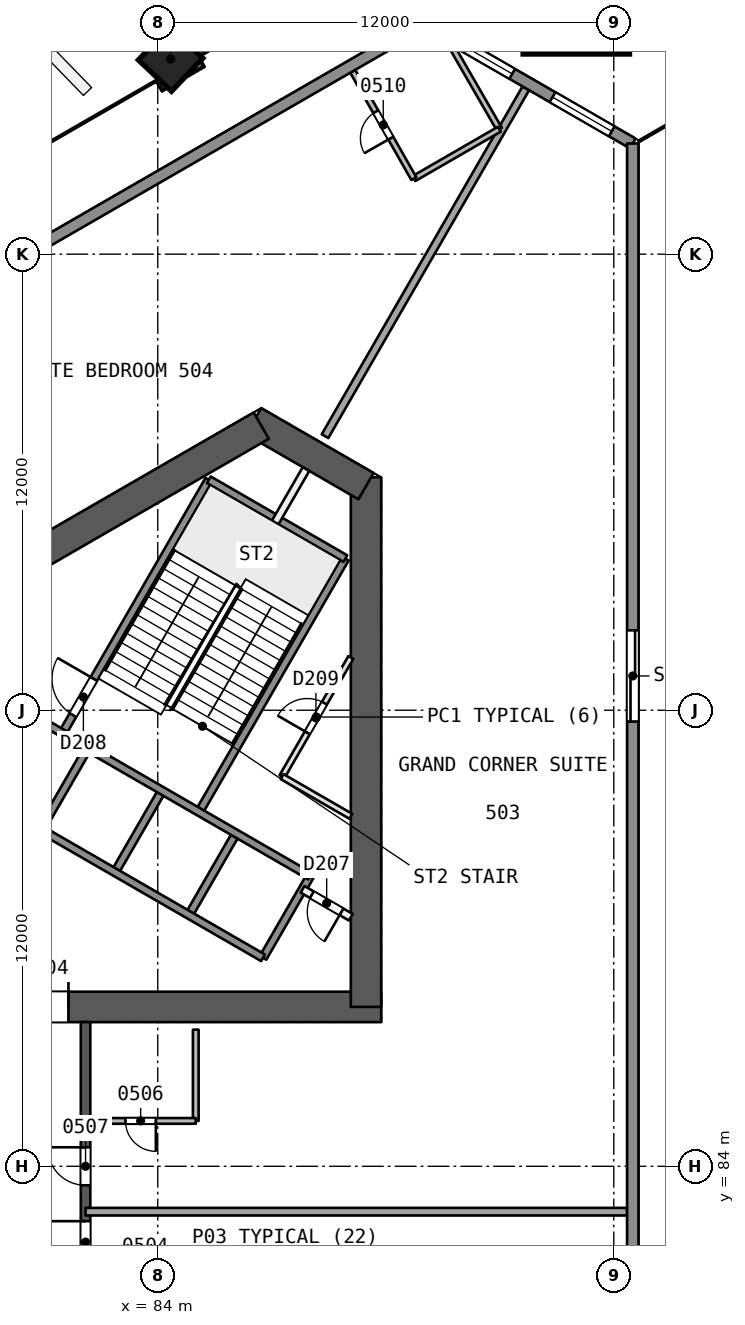
"""IFC4 building model, lengths in metres.
Left out: names, types, materials, properties, quantities, classifications, styles, units other than length and angle.
Written with IfcOpenShell. Run it as: python <this file> out.ifc"""

import sys

from ifc_helpers import new_model, si_unit, direction, frame, frame_2d, origin, origin_2d, place, context, subcontext, project, spatial, rectangle, extrude, element, fill, save


model = new_model("IFC4")
c1 = context("Model", 3, precision=1e-05, world=origin(), true_north=direction((0.0, 1.0)))
c2 = subcontext(c1, "Body", "Model", "MODEL_VIEW")
j1 = project(units=[si_unit("LENGTHUNIT", "METRE"), si_unit("PLANEANGLEUNIT", "RADIAN")], contexts=[c1])
p1 = place(None, origin())
s1 = spatial("IfcSite", under=j1, at=p1, CompositionType="ELEMENT")
p2 = place(p1, origin())
s2 = spatial("IfcBuilding", under=s1, at=p2, CompositionType="ELEMENT")
p3 = place(p2, frame((0.0, 0.0, 30.0)))
s3 = spatial("IfcBuildingStorey", under=s2, at=p3, CompositionType="ELEMENT", Elevation=30.0)
p4 = place(p3, frame((79.731, 88.194, 0.0), z_axis=(0.0, 0.0, 1.0), x_axis=(1.0, 0.0, 0.0)))
e1 = element("IfcWall", 1, at=p4, inside=s3, PredefinedType="SHEAR", context=c2, shape_type="SweptSolid", body=[
    extrude(rectangle(XDim=10.149, YDim=0.8, at=frame_2d((5.074, 0.0))), origin(), (0.0, 0.0, 1.0), 3.7),
])
p5 = place(p4, frame((0.719, 0.0, 0.0)))
e2 = element("IfcOpeningElement", 2, at=p5, cuts=e1, PredefinedType="OPENING", context=c2, shape_type="SweptSolid", body=[
    extrude(rectangle(XDim=1.2, YDim=2.1, at=frame_2d((0.6, 1.05))), frame((0.0, 0.411, 0.0), z_axis=(0.0, -1.0, 0.0), x_axis=(1.0, 0.0, 0.0)), (0.0, 0.0, 1.0), 0.821),
])
p6 = place(p3, frame((89.48, 88.194, 0.0), z_axis=(0.0, 0.0, 1.0), x_axis=(0.0, 1.0, 0.0)))
e3 = element("IfcWall", 3, at=p6, inside=s3, PredefinedType="SHEAR", context=c2, shape_type="SweptSolid", body=[
    extrude(rectangle(XDim=13.933, YDim=0.8, at=frame_2d((6.967, 0.0))), origin(), (0.0, 0.0, 1.0), 3.7),
])
p7 = place(p3, frame((89.48, 101.897, 0.0), z_axis=(0.0, 0.0, 1.0), x_axis=(-0.866034355626, 0.499984494636, 0.0)))
e4 = element("IfcWall", 4, at=p7, inside=s3, PredefinedType="SHEAR", context=c2, shape_type="SweptSolid", body=[
    extrude(rectangle(XDim=3.414, YDim=0.8, at=frame_2d((1.707, 0.0))), origin(), (0.0, 0.0, 1.0), 3.7),
])
p8 = place(p3, frame((86.723, 103.488, 0.0), z_axis=(0.0, 0.0, 1.0), x_axis=(-0.866032504327, -0.499987701298, 0.0)))
e5 = element("IfcWall", 5, at=p8, inside=s3, PredefinedType="SHEAR", context=c2, shape_type="SweptSolid", body=[
    extrude(rectangle(XDim=14.102, YDim=0.8, at=frame_2d((7.051, 0.0))), origin(), (0.0, 0.0, 1.0), 3.7),
])
p9 = place(p3, frame((82.1, 72.206, 0.0), z_axis=(0.0, 0.0, 1.0), x_axis=(0.0, 1.0, 0.0)))
e6 = element("IfcWall", 6, at=p9, inside=s3, PredefinedType="SHEAR", context=c2, shape_type="SweptSolid", body=[
    extrude(rectangle(XDim=15.588, YDim=0.25, at=frame_2d((7.794, 0.0))), origin(), (0.0, 0.0, 1.0), 3.2),
])
p10 = place(p9, frame((2.618, 0.0, 0.0)))
e7 = element("IfcOpeningElement", 7, at=p10, cuts=e6, PredefinedType="OPENING", context=c2, shape_type="SweptSolid", body=[
    extrude(rectangle(XDim=1.0, YDim=2.1, at=frame_2d((0.5, 1.05))), frame((0.0, 0.135, 0.0), z_axis=(0.0, -1.0, 0.0), x_axis=(1.0, 0.0, 0.0)), (0.0, 0.0, 1.0), 0.271),
])
p11 = place(p9, frame((9.25, 0.0, 0.0)))
e8 = element("IfcOpeningElement", 8, at=p11, cuts=e6, PredefinedType="OPENING", context=c2, shape_type="SweptSolid", body=[
    extrude(rectangle(XDim=1.1, YDim=2.1, at=frame_2d((0.55, 1.05))), frame((0.0, 0.135, 0.0), z_axis=(0.0, -1.0, 0.0), x_axis=(1.0, 0.0, 0.0)), (0.0, 0.0, 1.0), 0.271),
])
p12 = place(p9, frame((11.294, 0.0, 0.0)))
e9 = element("IfcOpeningElement", 9, at=p12, cuts=e6, PredefinedType="OPENING", context=c2, shape_type="SweptSolid", body=[
    extrude(rectangle(XDim=1.0, YDim=2.1, at=frame_2d((0.5, 1.05))), frame((0.0, 0.135, 0.0), z_axis=(0.0, -1.0, 0.0), x_axis=(1.0, 0.0, 0.0)), (0.0, 0.0, 1.0), 0.271),
])
p13 = place(p3, frame((95.035, 114.702, 0.0), z_axis=(-0.017607037296, -0.030466109479, 0.999380712447), x_axis=(0.500064653071, 0.865272876704, 0.035187946645)))
e10 = element("IfcColumn", 10, at=p13, inside=s3, PredefinedType="COLUMN", context=c2, shape_type="SweptSolid", body=[
    extrude(rectangle(XDim=2.8, YDim=2.8, at=origin_2d()), origin(), (0.0, 0.0, 1.0), 3.702),
])
p14 = place(p3, frame((84.349, 113.168, 0.0), z_axis=(-0.008376454378, -0.028163354484, 0.999568237028), x_axis=(0.865850871468, 0.499846877556, 0.02133933866)))
e11 = element("IfcColumn", 11, at=p14, inside=s3, PredefinedType="COLUMN", context=c2, shape_type="SweptSolid", body=[
    extrude(rectangle(XDim=1.2, YDim=1.2, at=origin_2d()), origin(), (0.0, 0.0, 1.0), 3.702),
])
p15 = place(p3, frame((96.351, 82.806, 0.0), z_axis=(0.0, 0.0, 1.0), x_axis=(-1.0, 0.0, 0.0)))
e12 = element("IfcWall", 12, at=p15, inside=s3, PredefinedType="PARTITIONING", context=c2, shape_type="SweptSolid", body=[
    extrude(rectangle(XDim=14.251, YDim=0.2, at=frame_2d((7.125, 0.0))), origin(), (0.0, 0.0, 1.0), 3.2),
])
p16 = place(p3, frame((85.0, 87.595, 0.0), z_axis=(0.0, 0.0, 1.0), x_axis=(0.0, -1.0, 0.0)))
e13 = element("IfcWall", 13, at=p16, inside=s3, PredefinedType="PARTITIONING", context=c2, shape_type="SweptSolid", body=[
    extrude(rectangle(XDim=2.401, YDim=0.15, at=frame_2d((1.2, 0.0))), origin(), (0.0, 0.0, 1.0), 3.2),
])
p17 = place(p3, frame((85.0, 85.194, 0.0), z_axis=(0.0, 0.0, 1.0), x_axis=(-1.0, 0.0, 0.0)))
e14 = element("IfcWall", 14, at=p17, inside=s3, PredefinedType="PARTITIONING", context=c2, shape_type="SweptSolid", body=[
    extrude(rectangle(XDim=2.9, YDim=0.15, at=frame_2d((1.45, 0.0))), origin(), (0.0, 0.0, 1.0), 3.2),
])
p18 = place(p17, frame((1.05, 0.0, 0.0)))
e15 = element("IfcOpeningElement", 15, at=p18, cuts=e14, PredefinedType="OPENING", context=c2, shape_type="SweptSolid", body=[
    extrude(rectangle(XDim=0.8, YDim=2.1, at=frame_2d((0.4, 1.05))), frame((0.0, 0.085, 0.0), z_axis=(0.0, -1.0, 0.0), x_axis=(1.0, 0.0, 0.0)), (0.0, 0.0, 1.0), 0.171),
])
p19 = place(p3, frame((93.686, 112.365, 0.0), z_axis=(0.0, 0.0, 1.0), x_axis=(-0.499997037832, -0.866027113986, 0.0)))
e16 = element("IfcWall", 16, at=p19, inside=s3, PredefinedType="PARTITIONING", context=c2, shape_type="SweptSolid", body=[
    extrude(rectangle(XDim=10.57, YDim=0.2, at=frame_2d((5.285, 0.0))), origin(), (0.0, 0.0, 1.0), 3.2),
])
p20 = place(p3, frame((91.709, 113.506, 0.0), z_axis=(0.0, 0.0, 1.0), x_axis=(0.500025035936, -0.866010948798, 0.0)))
e17 = element("IfcWall", 17, at=p20, inside=s3, PredefinedType="PARTITIONING", context=c2, shape_type="SweptSolid", body=[
    extrude(rectangle(XDim=2.561, YDim=0.15, at=frame_2d((1.28, 0.0))), origin(), (0.0, 0.0, 1.0), 3.2),
])
p21 = place(p3, frame((92.99, 111.288, 0.0), z_axis=(0.0, 0.0, 1.0), x_axis=(-0.866021400173, -0.500006934395, 0.0)))
e18 = element("IfcWall", 18, at=p21, inside=s3, PredefinedType="PARTITIONING", context=c2, shape_type="SweptSolid", body=[
    extrude(rectangle(XDim=2.6, YDim=0.15, at=frame_2d((1.3, 0.0))), origin(), (0.0, 0.0, 1.0), 3.2),
])
p22 = place(p3, frame((90.738, 109.988, 0.0), z_axis=(0.0, 0.0, 1.0), x_axis=(-0.494941047154, 0.868926556069, 0.0)))
e19 = element("IfcWall", 19, at=p22, inside=s3, PredefinedType="PARTITIONING", context=c2, shape_type="SweptSolid", body=[
    extrude(rectangle(XDim=3.25, YDim=0.15, at=frame_2d((1.625, 0.0))), origin(), (0.0, 0.0, 1.0), 3.2),
])
p23 = place(p22, frame((1.225, 0.0, 0.0)))
e20 = element("IfcOpeningElement", 20, at=p23, cuts=e19, PredefinedType="OPENING", context=c2, shape_type="SweptSolid", body=[
    extrude(rectangle(XDim=0.8, YDim=2.1, at=frame_2d((0.4, 1.05))), frame((0.0, 0.085, 0.0), z_axis=(0.0, -1.0, 0.0), x_axis=(1.0, 0.0, 0.0)), (0.0, 0.0, 1.0), 0.171),
])
p24 = place(p3, frame((91.021, 114.076, 0.0), z_axis=(0.0, 0.0, 1.0), x_axis=(0.866033291922, -0.499986337096, 0.0)))
e21 = element("IfcWall", 21, at=p24, inside=s3, PredefinedType="SOLIDWALL", context=c2, shape_type="SweptSolid", body=[
    extrude(rectangle(XDim=6.327, YDim=0.3, at=frame_2d((3.164, 0.0))), origin(), (0.0, 0.0, 1.0), 3.2),
])
p25 = place(p24, frame((0.863, 0.0, 0.9)))
e22 = element("IfcOpeningElement", 22, at=p25, cuts=e21, PredefinedType="OPENING", context=c2, shape_type="SweptSolid", body=[
    extrude(rectangle(XDim=1.8, YDim=1.5, at=frame_2d((0.9, 0.75))), frame((0.0, 0.161, 0.0), z_axis=(0.0, -1.0, 0.0), x_axis=(1.0, 0.0, 0.0)), (0.0, 0.0, 1.0), 0.321),
])
p26 = place(p24, frame((3.888, 0.0, 0.9)))
e23 = element("IfcOpeningElement", 23, at=p26, cuts=e21, PredefinedType="OPENING", context=c2, shape_type="SweptSolid", body=[
    extrude(rectangle(XDim=1.8, YDim=1.5, at=frame_2d((0.9, 0.75))), frame((0.0, 0.161, 0.0), z_axis=(0.0, -1.0, 0.0), x_axis=(1.0, 0.0, 0.0)), (0.0, 0.0, 1.0), 0.321),
])
p27 = place(p3, frame((96.5, 110.912, 0.0), z_axis=(0.0, 0.0, 1.0), x_axis=(0.0, -1.0, 0.0)))
e24 = element("IfcWall", 24, at=p27, inside=s3, PredefinedType="SOLIDWALL", context=c2, shape_type="SweptSolid", body=[
    extrude(rectangle(XDim=61.825, YDim=0.3, at=frame_2d((30.912, 0.0))), origin(), (0.0, 0.0, 1.0), 3.2),
])
p28 = place(p27, frame((29.089, 0.0, 0.0)))
e25 = element("IfcOpeningElement", 25, at=p28, cuts=e24, PredefinedType="OPENING", context=c2, shape_type="SweptSolid", body=[
    extrude(rectangle(XDim=2.4, YDim=2.4, at=frame_2d((1.2, 1.2))), frame((0.0, 0.161, 0.0), z_axis=(0.0, -1.0, 0.0), x_axis=(1.0, 0.0, 0.0)), (0.0, 0.0, 1.0), 0.321),
])
p29 = place(p27, frame((34.389, 0.0, 0.0)))
e26 = element("IfcOpeningElement", 26, at=p29, cuts=e24, PredefinedType="OPENING", context=c2, shape_type="SweptSolid", body=[
    extrude(rectangle(XDim=2.4, YDim=2.4, at=frame_2d((1.2, 1.2))), frame((0.0, 0.161, 0.0), z_axis=(0.0, -1.0, 0.0), x_axis=(1.0, 0.0, 0.0)), (0.0, 0.0, 1.0), 0.321),
])
p30 = place(p27, frame((47.93, 0.0, 0.0)))
e27 = element("IfcOpeningElement", 27, at=p30, cuts=e24, PredefinedType="OPENING", context=c2, shape_type="SweptSolid", body=[
    extrude(rectangle(XDim=2.4, YDim=2.4, at=frame_2d((1.2, 1.2))), frame((0.0, 0.161, 0.0), z_axis=(0.0, -1.0, 0.0), x_axis=(1.0, 0.0, 0.0)), (0.0, 0.0, 1.0), 0.321),
])
p31 = place(p27, frame((12.81, 0.0, 0.0)))
e28 = element("IfcOpeningElement", 28, at=p31, cuts=e24, PredefinedType="OPENING", context=c2, shape_type="SweptSolid", body=[
    extrude(rectangle(XDim=2.4, YDim=2.4, at=frame_2d((1.2, 1.2))), frame((0.0, 0.161, 0.0), z_axis=(0.0, -1.0, 0.0), x_axis=(1.0, 0.0, 0.0)), (0.0, 0.0, 1.0), 0.321),
])
p32 = place(p3, frame((37.479, 83.163, 0.0), z_axis=(0.0, 0.0, 1.0), x_axis=(0.866024340432, 0.500001841776, 0.0)))
e29 = element("IfcWall", 29, at=p32, inside=s3, PredefinedType="SOLIDWALL", context=c2, shape_type="SweptSolid", body=[
    extrude(rectangle(XDim=61.824, YDim=0.3, at=frame_2d((30.912, 0.0))), origin(), (0.0, 0.0, 1.0), 3.2),
])
p33 = place(p32, frame((29.556, 0.0, 0.0)))
e30 = element("IfcOpeningElement", 30, at=p33, cuts=e29, PredefinedType="OPENING", context=c2, shape_type="SweptSolid", body=[
    extrude(rectangle(XDim=2.4, YDim=2.4, at=frame_2d((1.2, 1.2))), frame((0.0, 0.161, 0.0), z_axis=(0.0, -1.0, 0.0), x_axis=(1.0, 0.0, 0.0)), (0.0, 0.0, 1.0), 0.321),
])
p34 = place(p32, frame((35.012, 0.0, 0.0)))
e31 = element("IfcOpeningElement", 31, at=p34, cuts=e29, PredefinedType="OPENING", context=c2, shape_type="SweptSolid", body=[
    extrude(rectangle(XDim=2.4, YDim=2.4, at=frame_2d((1.2, 1.2))), frame((0.0, 0.161, 0.0), z_axis=(0.0, -1.0, 0.0), x_axis=(1.0, 0.0, 0.0)), (0.0, 0.0, 1.0), 0.321),
])
p35 = place(p32, frame((47.93, 0.0, 0.0)))
e32 = element("IfcOpeningElement", 32, at=p35, cuts=e29, PredefinedType="OPENING", context=c2, shape_type="SweptSolid", body=[
    extrude(rectangle(XDim=2.4, YDim=2.4, at=frame_2d((1.2, 1.2))), frame((0.0, 0.161, 0.0), z_axis=(0.0, -1.0, 0.0), x_axis=(1.0, 0.0, 0.0)), (0.0, 0.0, 1.0), 0.321),
])
p36 = place(p32, frame((24.256, 0.0, 0.0)))
e33 = element("IfcOpeningElement", 33, at=p36, cuts=e29, PredefinedType="OPENING", context=c2, shape_type="SweptSolid", body=[
    extrude(rectangle(XDim=2.4, YDim=2.4, at=frame_2d((1.2, 1.2))), frame((0.0, 0.161, 0.0), z_axis=(0.0, -1.0, 0.0), x_axis=(1.0, 0.0, 0.0)), (0.0, 0.0, 1.0), 0.321),
])
p37 = place(p32, frame((11.509, 0.0, 0.0)))
e34 = element("IfcOpeningElement", 34, at=p37, cuts=e29, PredefinedType="OPENING", context=c2, shape_type="SweptSolid", body=[
    extrude(rectangle(XDim=2.4, YDim=2.4, at=frame_2d((1.2, 1.2))), frame((0.0, 0.161, 0.0), z_axis=(0.0, -1.0, 0.0), x_axis=(1.0, 0.0, 0.0)), (0.0, 0.0, 1.0), 0.321),
])
p38 = place(p3, frame((86.77, 89.486, 0.0), z_axis=(0.0, 0.0, 1.0), x_axis=(0.499961042966, 0.86604789447, 0.0)))
e35 = element("IfcWall", 35, at=p38, inside=s3, PredefinedType="SOLIDWALL", context=c2, shape_type="SweptSolid", body=[
    extrude(rectangle(XDim=2.48, YDim=0.2, at=frame_2d((1.24, 0.0))), origin(), (0.0, 0.0, 1.0), 3.2),
])
p39 = place(p3, frame((87.271, 94.254, 0.0), z_axis=(0.0, 0.0, 1.0), x_axis=(0.500043727655, 0.866000156139, 0.0)))
e36 = element("IfcWall", 36, at=p39, inside=s3, PredefinedType="PARTITIONING", context=c2, shape_type="SweptSolid", body=[
    extrude(rectangle(XDim=3.618, YDim=0.15, at=frame_2d((1.809, 0.0))), origin(), (0.0, 0.0, 1.0), 3.2),
])
p40 = place(p39, frame((1.332, 0.0, 0.0)))
e37 = element("IfcOpeningElement", 37, at=p40, cuts=e36, PredefinedType="OPENING", context=c2, shape_type="SweptSolid", body=[
    extrude(rectangle(XDim=0.9, YDim=2.1, at=frame_2d((0.45, 1.05))), frame((0.0, 0.085, 0.0), z_axis=(0.0, -1.0, 0.0), x_axis=(1.0, 0.0, 0.0)), (0.0, 0.0, 1.0), 0.171),
])
p41 = place(p3, frame((84.821, 90.611, 0.0), z_axis=(0.0, 0.0, 1.0), x_axis=(0.499961042966, 0.86604789447, 0.0)))
e38 = element("IfcWall", 38, at=p41, inside=s3, PredefinedType="SOLIDWALL", context=c2, shape_type="SweptSolid", body=[
    extrude(rectangle(XDim=2.48, YDim=0.2, at=frame_2d((1.24, 0.0))), origin(), (0.0, 0.0, 1.0), 3.2),
])
p42 = place(p3, frame((85.087, 93.321, 0.0), z_axis=(0.0, 0.0, 1.0), x_axis=(0.500019787375, 0.866013979237, 0.0)))
e39 = element("IfcWall", 39, at=p42, inside=s3, PredefinedType="SOLIDWALL", context=c2, shape_type="SweptSolid", body=[
    extrude(rectangle(XDim=7.7, YDim=0.2, at=frame_2d((3.85, 0.0))), origin(), (0.0, 0.0, 1.0), 3.2),
])
p43 = place(p3, frame((82.873, 91.736, 0.0), z_axis=(0.0, 0.0, 1.0), x_axis=(0.499961042966, 0.86604789447, 0.0)))
e40 = element("IfcWall", 40, at=p43, inside=s3, PredefinedType="SOLIDWALL", context=c2, shape_type="SweptSolid", body=[
    extrude(rectangle(XDim=2.48, YDim=0.2, at=frame_2d((1.24, 0.0))), origin(), (0.0, 0.0, 1.0), 3.2),
])
p44 = place(p3, frame((87.09, 100.94, 0.0), z_axis=(0.0, 0.0, 1.0), x_axis=(0.499956811548, 0.866050337213, 0.0)))
e41 = element("IfcWall", 41, at=p44, inside=s3, PredefinedType="PARTITIONING", context=c2, shape_type="SweptSolid", body=[
    extrude(rectangle(XDim=1.623, YDim=0.2, at=frame_2d((0.812, 0.0))), origin(), (0.0, 0.0, 1.0), 3.2),
])
p45 = place(p3, frame((80.924, 92.861, 0.0), z_axis=(0.0, 0.0, 1.0), x_axis=(0.499961042966, 0.86604789447, 0.0)))
e42 = element("IfcWall", 42, at=p45, inside=s3, PredefinedType="SOLIDWALL", context=c2, shape_type="SweptSolid", body=[
    extrude(rectangle(XDim=2.48, YDim=0.2, at=frame_2d((1.24, 0.0))), origin(), (0.0, 0.0, 1.0), 3.2),
])
p46 = place(p3, frame((81.493, 95.396, 0.0), z_axis=(0.0, 0.0, 1.0), x_axis=(0.500006057782, 0.866021906294, 0.0)))
e43 = element("IfcWall", 43, at=p46, inside=s3, PredefinedType="SOLIDWALL", context=c2, shape_type="SweptSolid", body=[
    extrude(rectangle(XDim=7.7, YDim=0.2, at=frame_2d((3.85, 0.0))), origin(), (0.0, 0.0, 1.0), 3.2),
])
p47 = place(p46, frame((0.55, 0.0, 0.0)))
e44 = element("IfcOpeningElement", 44, at=p47, cuts=e43, PredefinedType="OPENING", context=c2, shape_type="SweptSolid", body=[
    extrude(rectangle(XDim=1.1, YDim=2.1, at=frame_2d((0.55, 1.05))), frame((0.0, 0.11, 0.0), z_axis=(0.0, -1.0, 0.0), x_axis=(1.0, 0.0, 0.0)), (0.0, 0.0, 1.0), 0.221),
])
p48 = place(p3, frame((86.77, 89.486, 0.0), z_axis=(0.0, 0.0, 1.0), x_axis=(-0.86601811187, 0.500012629753, 0.0)))
e45 = element("IfcWall", 45, at=p48, inside=s3, PredefinedType="SOLIDWALL", context=c2, shape_type="SweptSolid", body=[
    extrude(rectangle(XDim=10.9, YDim=0.2, at=frame_2d((5.45, 0.0))), origin(), (0.0, 0.0, 1.0), 3.2),
])
p49 = place(p3, frame((89.08, 90.554, 0.0), z_axis=(0.0, 0.0, 1.0), x_axis=(-0.866022048785, 0.500005810984, 0.0)))
e46 = element("IfcWall", 46, at=p49, inside=s3, PredefinedType="PARTITIONING", context=c2, shape_type="SweptSolid", body=[
    extrude(rectangle(XDim=1.467, YDim=0.2, at=frame_2d((0.733, 0.0))), origin(), (0.0, 0.0, 1.0), 3.2),
])
p50 = place(p49, frame((0.283, 0.0, 0.0)))
e47 = element("IfcOpeningElement", 47, at=p50, cuts=e46, PredefinedType="OPENING", context=c2, shape_type="SweptSolid", body=[
    extrude(rectangle(XDim=0.9, YDim=2.1, at=frame_2d((0.45, 1.05))), frame((0.0, 0.11, 0.0), z_axis=(0.0, -1.0, 0.0), x_axis=(1.0, 0.0, 0.0)), (0.0, 0.0, 1.0), 0.221),
])
p51 = place(p3, frame((88.01, 91.634, 0.0), z_axis=(0.0, 0.0, 1.0), x_axis=(-0.866024315419, 0.5000018851, 0.0)))
e48 = element("IfcWall", 48, at=p51, inside=s3, PredefinedType="SOLIDWALL", context=c2, shape_type="SweptSolid", body=[
    extrude(rectangle(XDim=9.0, YDim=0.2, at=frame_2d((4.5, 0.0))), origin(), (0.0, 0.0, 1.0), 3.2),
])
p52 = place(p3, frame((89.08, 93.21, 0.0), z_axis=(0.0, 0.0, 1.0), x_axis=(-0.866033778982, 0.499985493453, 0.0)))
e49 = element("IfcWall", 49, at=p52, inside=s3, PredefinedType="PARTITIONING", context=c2, shape_type="SweptSolid", body=[
    extrude(rectangle(XDim=2.089, YDim=0.15, at=frame_2d((1.044, 0.0))), origin(), (0.0, 0.0, 1.0), 3.2),
])
p53 = place(p3, frame((88.937, 99.99, 0.0), z_axis=(0.0, 0.0, 1.0), x_axis=(-0.866004344652, 0.500036473714, 0.0)))
e50 = element("IfcWall", 50, at=p53, inside=s3, PredefinedType="SOLIDWALL", context=c2, shape_type="SweptSolid", body=[
    extrude(rectangle(XDim=4.15, YDim=0.2, at=frame_2d((2.075, 0.0))), origin(), (0.0, 0.0, 1.0), 3.2),
])
p54 = place(p11, origin())
e51 = element("IfcDoor", 51, at=p54, inside=s3, OperationType="SINGLE_SWING_RIGHT", PredefinedType="NOTDEFINED", context=c2, shape_type="SweptSolid", body=[
    extrude(rectangle(XDim=1.1, YDim=2.1, at=frame_2d((0.55, 1.05))), frame((0.0, 0.025, 0.0), z_axis=(0.0, -1.0, 0.0), x_axis=(1.0, 0.0, 0.0)), (0.0, 0.0, 1.0), 0.05),
])
fill(e8, e51)
p55 = place(p18, origin())
e52 = element("IfcDoor", 52, at=p55, inside=s3, OperationType="SINGLE_SWING_LEFT", PredefinedType="NOTDEFINED", context=c2, shape_type="SweptSolid", body=[
    extrude(rectangle(XDim=0.8, YDim=2.1, at=frame_2d((0.4, 1.05))), frame((0.0, 0.025, 0.0), z_axis=(0.0, -1.0, 0.0), x_axis=(1.0, 0.0, 0.0)), (0.0, 0.0, 1.0), 0.05),
])
fill(e15, e52)
p56 = place(p12, origin())
e53 = element("IfcDoor", 53, at=p56, inside=s3, OperationType="SINGLE_SWING_RIGHT", PredefinedType="NOTDEFINED", context=c2, shape_type="SweptSolid", body=[
    extrude(rectangle(XDim=1.0, YDim=2.1, at=frame_2d((0.5, 1.05))), frame((0.0, 0.025, 0.0), z_axis=(0.0, -1.0, 0.0), x_axis=(1.0, 0.0, 0.0)), (0.0, 0.0, 1.0), 0.05),
])
fill(e9, e53)
p57 = place(p23, origin())
e54 = element("IfcDoor", 54, at=p57, inside=s3, OperationType="SINGLE_SWING_LEFT", PredefinedType="NOTDEFINED", context=c2, shape_type="SweptSolid", body=[
    extrude(rectangle(XDim=0.8, YDim=2.1, at=frame_2d((0.4, 1.05))), frame((0.0, 0.025, 0.0), z_axis=(0.0, -1.0, 0.0), x_axis=(1.0, 0.0, 0.0)), (0.0, 0.0, 1.0), 0.05),
])
fill(e20, e54)
p58 = place(p25, origin())
e55 = element("IfcWindow", 55, at=p58, inside=s3, PartitioningType="SINGLE_PANEL", PredefinedType="WINDOW", context=c2, shape_type="SweptSolid", body=[
    extrude(rectangle(XDim=1.8, YDim=1.5, at=frame_2d((0.9, 0.75))), frame((0.0, 0.03, 0.0), z_axis=(0.0, -1.0, 0.0), x_axis=(1.0, 0.0, 0.0)), (0.0, 0.0, 1.0), 0.06),
])
fill(e22, e55)
p59 = place(p26, origin())
e56 = element("IfcWindow", 56, at=p59, inside=s3, PartitioningType="SINGLE_PANEL", PredefinedType="WINDOW", context=c2, shape_type="SweptSolid", body=[
    extrude(rectangle(XDim=1.8, YDim=1.5, at=frame_2d((0.9, 0.75))), frame((0.0, 0.03, 0.0), z_axis=(0.0, -1.0, 0.0), x_axis=(1.0, 0.0, 0.0)), (0.0, 0.0, 1.0), 0.06),
])
fill(e23, e56)
p60 = place(p31, origin())
e57 = element("IfcDoor", 57, at=p60, inside=s3, OperationType="SLIDING_TO_RIGHT", PredefinedType="NOTDEFINED", context=c2, shape_type="SweptSolid", body=[
    extrude(rectangle(XDim=2.4, YDim=2.4, at=frame_2d((1.2, 1.2))), frame((0.0, 0.025, 0.0), z_axis=(0.0, -1.0, 0.0), x_axis=(1.0, 0.0, 0.0)), (0.0, 0.0, 1.0), 0.05),
])
fill(e28, e57)
p61 = place(p5, origin())
e58 = element("IfcDoor", 58, at=p61, inside=s3, OperationType="SINGLE_SWING_RIGHT", PredefinedType="NOTDEFINED", context=c2, shape_type="SweptSolid", body=[
    extrude(rectangle(XDim=1.2, YDim=2.1, at=frame_2d((0.6, 1.05))), frame((0.0, 0.025, 0.0), z_axis=(0.0, -1.0, 0.0), x_axis=(1.0, 0.0, 0.0)), (0.0, 0.0, 1.0), 0.05),
])
fill(e2, e58)
p62 = place(p50, origin())
e59 = element("IfcDoor", 59, at=p62, inside=s3, OperationType="SINGLE_SWING_LEFT", PredefinedType="NOTDEFINED", context=c2, shape_type="SweptSolid", body=[
    extrude(rectangle(XDim=0.9, YDim=2.1, at=frame_2d((0.45, 1.05))), frame((0.0, 0.025, 0.0), z_axis=(0.0, -1.0, 0.0), x_axis=(1.0, 0.0, 0.0)), (0.0, 0.0, 1.0), 0.05),
])
fill(e47, e59)
p63 = place(p47, origin())
e60 = element("IfcDoor", 60, at=p63, inside=s3, OperationType="SINGLE_SWING_RIGHT", PredefinedType="NOTDEFINED", context=c2, shape_type="SweptSolid", body=[
    extrude(rectangle(XDim=1.1, YDim=2.1, at=frame_2d((0.55, 1.05))), frame((0.0, 0.025, 0.0), z_axis=(0.0, -1.0, 0.0), x_axis=(1.0, 0.0, 0.0)), (0.0, 0.0, 1.0), 0.05),
])
fill(e44, e60)
p64 = place(p40, origin())
e61 = element("IfcDoor", 61, at=p64, inside=s3, OperationType="SINGLE_SWING_LEFT", PredefinedType="NOTDEFINED", context=c2, shape_type="SweptSolid", body=[
    extrude(rectangle(XDim=0.9, YDim=2.1, at=frame_2d((0.45, 1.05))), frame((0.0, 0.025, 0.0), z_axis=(0.0, -1.0, 0.0), x_axis=(1.0, 0.0, 0.0)), (0.0, 0.0, 1.0), 0.05),
])
fill(e37, e61)
save(model, sys.argv[1])
